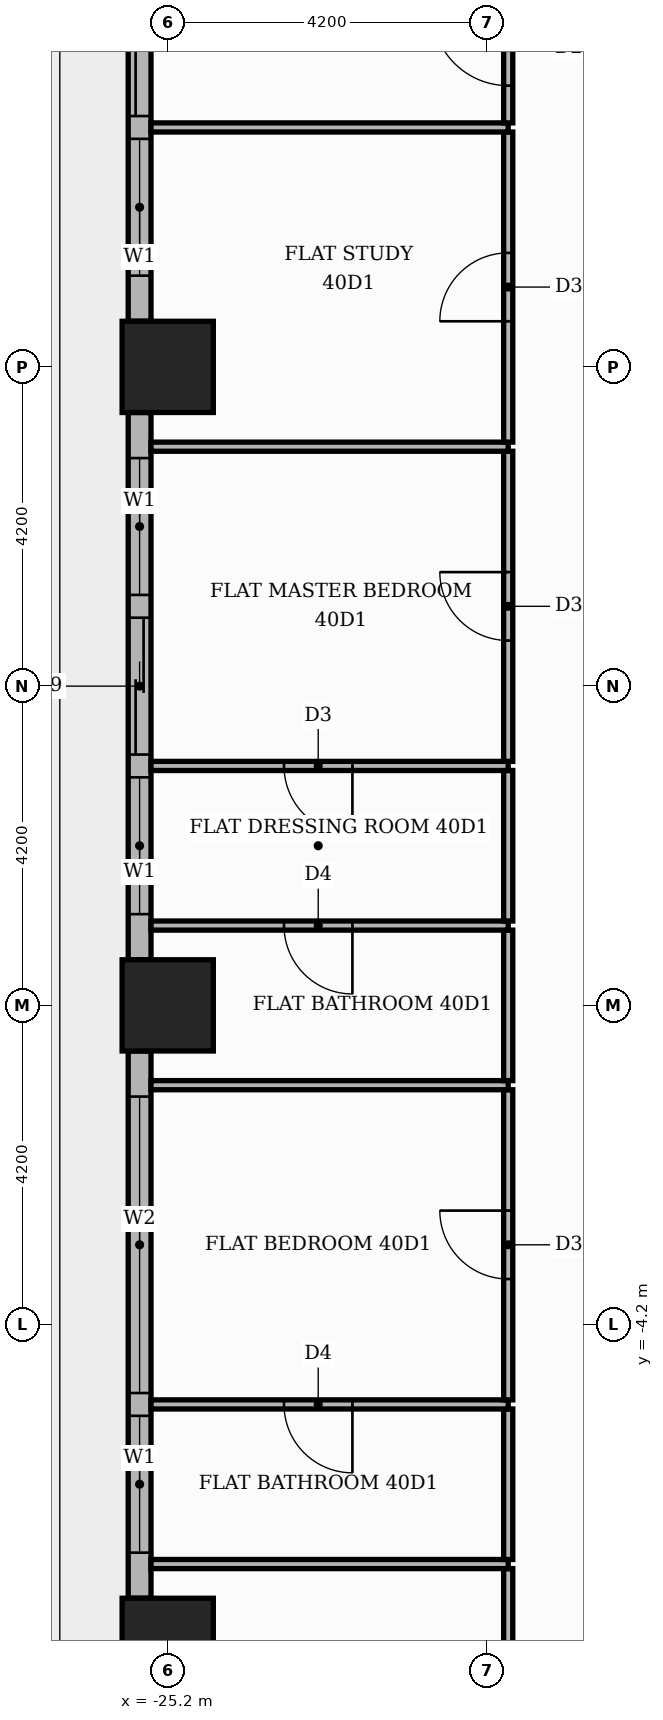
"""IFC4 building model, lengths in metres.
Left out: names, types, materials, properties, quantities, classifications, styles, units other than length and angle.
Written with IfcOpenShell. Run it as: python <this file> out.ifc"""

import sys

from ifc_helpers import new_model, si_unit, direction, frame, frame_2d, origin, origin_2d, place, context, subcontext, project, spatial, rectangle, extrude, element, fill, save


model = new_model("IFC4")
c1 = context("Model", 3, precision=1e-05, world=origin(), true_north=direction((0.0, 1.0)))
c2 = subcontext(c1, "Body", "Model", "MODEL_VIEW")
j1 = project(units=[si_unit("LENGTHUNIT", "METRE"), si_unit("PLANEANGLEUNIT", "RADIAN")], contexts=[c1])
p1 = place(None, origin())
s1 = spatial("IfcSite", under=j1, at=p1, CompositionType="ELEMENT")
p2 = place(p1, origin())
s2 = spatial("IfcBuilding", under=s1, at=p2, CompositionType="ELEMENT")
p3 = place(p2, frame((0.0, 0.0, 168.9)))
s3 = spatial("IfcBuildingStorey", under=s2, at=p3, CompositionType="ELEMENT", Elevation=168.9)
for number, where, z_axis, x_axis in (
    (1, (-25.2, 0.0, 0.0), (0.0, 0.0, 1.0), (1.0, 0.0, 0.0)),
    (2, (-25.2, -8.4, 0.0), (0.0, 0.0, 1.0), (1.0, 0.0, 0.0)),
    (3, (-25.2, 8.4, 0.0), (0.0, 0.0, 1.0), (1.0, 0.0, 0.0)),
):
    element("IfcColumn", number, at=place(p3, frame(where, z_axis=z_axis, x_axis=x_axis)), inside=s3, PredefinedType="COLUMN", context=c2, shape_type="SweptSolid", body=[
        extrude(rectangle(XDim=1.2, YDim=1.2, at=origin_2d()), origin(), (0.0, 0.0, 1.0), 3.9),
    ])
p4 = place(p3, frame((-25.57, 16.2, 0.0), z_axis=(0.0, 0.0, 1.0), x_axis=(0.0, -1.0, 0.0)))
e4 = element("IfcWall", 4, at=p4, inside=s3, PredefinedType="STANDARD", context=c2, shape_type="SweptSolid", body=[
    extrude(rectangle(XDim=7.2, YDim=0.3, at=frame_2d((3.6, 0.0))), origin(), (0.0, 0.0, 1.0), 3.48),
])
p5 = place(p4, frame((0.6, 0.0, 0.0)))
e5 = element("IfcOpeningElement", 5, at=p5, cuts=e4, PredefinedType="OPENING", context=c2, shape_type="SweptSolid", body=[
    extrude(rectangle(XDim=3.9, YDim=2.4, at=frame_2d((1.95, 1.2))), frame((0.0, 0.16, 0.0), z_axis=(0.0, -1.0, 0.0), x_axis=(1.0, 0.0, 0.0)), (0.0, 0.0, 1.0), 0.32),
])
p6 = place(p4, frame((4.8, 0.0, 0.9)))
e6 = element("IfcOpeningElement", 6, at=p6, cuts=e4, PredefinedType="OPENING", context=c2, shape_type="SweptSolid", body=[
    extrude(rectangle(XDim=1.8, YDim=2.1, at=frame_2d((0.9, 1.05))), frame((0.0, 0.16, 0.0), z_axis=(0.0, -1.0, 0.0), x_axis=(1.0, 0.0, 0.0)), (0.0, 0.0, 1.0), 0.32),
])
p7 = place(p3, frame((-25.57, 7.8, 0.0), z_axis=(0.0, 0.0, 1.0), x_axis=(0.0, -1.0, 0.0)))
e7 = element("IfcWall", 7, at=p7, inside=s3, PredefinedType="STANDARD", context=c2, shape_type="SweptSolid", body=[
    extrude(rectangle(XDim=7.2, YDim=0.3, at=frame_2d((3.6, 0.0))), origin(), (0.0, 0.0, 1.0), 3.48),
])
p8 = place(p7, frame((0.6, 0.0, 0.9)))
e8 = element("IfcOpeningElement", 8, at=p8, cuts=e7, PredefinedType="OPENING", context=c2, shape_type="SweptSolid", body=[
    extrude(rectangle(XDim=1.8, YDim=2.1, at=frame_2d((0.9, 1.05))), frame((0.0, 0.16, 0.0), z_axis=(0.0, -1.0, 0.0), x_axis=(1.0, 0.0, 0.0)), (0.0, 0.0, 1.0), 0.32),
])
p9 = place(p7, frame((2.7, 0.0, 0.0)))
e9 = element("IfcOpeningElement", 9, at=p9, cuts=e7, PredefinedType="OPENING", context=c2, shape_type="SweptSolid", body=[
    extrude(rectangle(XDim=1.8, YDim=2.4, at=frame_2d((0.9, 1.2))), frame((0.0, 0.16, 0.0), z_axis=(0.0, -1.0, 0.0), x_axis=(1.0, 0.0, 0.0)), (0.0, 0.0, 1.0), 0.32),
])
p10 = place(p7, frame((4.8, 0.0, 0.9)))
e10 = element("IfcOpeningElement", 10, at=p10, cuts=e7, PredefinedType="OPENING", context=c2, shape_type="SweptSolid", body=[
    extrude(rectangle(XDim=1.8, YDim=2.1, at=frame_2d((0.9, 1.05))), frame((0.0, 0.16, 0.0), z_axis=(0.0, -1.0, 0.0), x_axis=(1.0, 0.0, 0.0)), (0.0, 0.0, 1.0), 0.32),
])
p11 = place(p3, frame((-25.57, -0.6, 0.0), z_axis=(0.0, 0.0, 1.0), x_axis=(0.0, -1.0, 0.0)))
e11 = element("IfcWall", 11, at=p11, inside=s3, PredefinedType="STANDARD", context=c2, shape_type="SweptSolid", body=[
    extrude(rectangle(XDim=7.2, YDim=0.3, at=frame_2d((3.6, 0.0))), origin(), (0.0, 0.0, 1.0), 3.48),
])
p12 = place(p11, frame((0.6, 0.0, 0.9)))
e12 = element("IfcOpeningElement", 12, at=p12, cuts=e11, PredefinedType="OPENING", context=c2, shape_type="SweptSolid", body=[
    extrude(rectangle(XDim=3.9, YDim=2.1, at=frame_2d((1.95, 1.05))), frame((0.0, 0.16, 0.0), z_axis=(0.0, -1.0, 0.0), x_axis=(1.0, 0.0, 0.0)), (0.0, 0.0, 1.0), 0.32),
])
p13 = place(p11, frame((4.8, 0.0, 0.9)))
e13 = element("IfcOpeningElement", 13, at=p13, cuts=e11, PredefinedType="OPENING", context=c2, shape_type="SweptSolid", body=[
    extrude(rectangle(XDim=1.8, YDim=2.1, at=frame_2d((0.9, 1.05))), frame((0.0, 0.16, 0.0), z_axis=(0.0, -1.0, 0.0), x_axis=(1.0, 0.0, 0.0)), (0.0, 0.0, 1.0), 0.32),
])
p14 = place(p3, frame((-20.72, -11.49, 0.0), z_axis=(0.0, 0.0, 1.0), x_axis=(0.0, 1.0, 0.0)))
e14 = element("IfcWall", 14, at=p14, inside=s3, PredefinedType="PARTITIONING", context=c2, shape_type="SweptSolid", body=[
    extrude(rectangle(XDim=4.08, YDim=0.12, at=frame_2d((2.04, 0.0))), origin(), (0.0, 0.0, 1.0), 3.48),
])
p15 = place(p14, frame((1.59, 0.0, 0.0)))
e15 = element("IfcOpeningElement", 15, at=p15, cuts=e14, PredefinedType="OPENING", context=c2, shape_type="SweptSolid", body=[
    extrude(rectangle(XDim=0.9, YDim=2.1, at=frame_2d((0.45, 1.05))), frame((0.0, 0.07, 0.0), z_axis=(0.0, -1.0, 0.0), x_axis=(1.0, 0.0, 0.0)), (0.0, 0.0, 1.0), 0.14),
])
p16 = place(p3, frame((-25.42, -7.35, 0.0), z_axis=(0.0, 0.0, 1.0), x_axis=(1.0, 0.0, 0.0)))
e16 = element("IfcWall", 16, at=p16, inside=s3, PredefinedType="PARTITIONING", context=c2, shape_type="SweptSolid", body=[
    extrude(rectangle(XDim=4.7, YDim=0.12, at=frame_2d((2.35, 0.0))), origin(), (0.0, 0.0, 1.0), 3.48),
])
p17 = place(p3, frame((-20.72, -7.29, 0.0), z_axis=(0.0, 0.0, 1.0), x_axis=(0.0, 1.0, 0.0)))
e17 = element("IfcWall", 17, at=p17, inside=s3, PredefinedType="PARTITIONING", context=c2, shape_type="SweptSolid", body=[
    extrude(rectangle(XDim=1.98, YDim=0.12, at=frame_2d((0.99, 0.0))), origin(), (0.0, 0.0, 1.0), 3.48),
])
p18 = place(p3, frame((-25.42, -5.25, 0.0), z_axis=(0.0, 0.0, 1.0), x_axis=(1.0, 0.0, 0.0)))
e18 = element("IfcWall", 18, at=p18, inside=s3, PredefinedType="PARTITIONING", context=c2, shape_type="SweptSolid", body=[
    extrude(rectangle(XDim=4.7, YDim=0.12, at=frame_2d((2.35, 0.0))), origin(), (0.0, 0.0, 1.0), 3.48),
])
p19 = place(p18, frame((1.75, 0.0, 0.0)))
e19 = element("IfcOpeningElement", 19, at=p19, cuts=e18, PredefinedType="OPENING", context=c2, shape_type="SweptSolid", body=[
    extrude(rectangle(XDim=0.9, YDim=2.1, at=frame_2d((0.45, 1.05))), frame((0.0, 0.07, 0.0), z_axis=(0.0, -1.0, 0.0), x_axis=(1.0, 0.0, 0.0)), (0.0, 0.0, 1.0), 0.14),
])
p20 = place(p3, frame((-20.72, -5.19, 0.0), z_axis=(0.0, 0.0, 1.0), x_axis=(0.0, 1.0, 0.0)))
e20 = element("IfcWall", 20, at=p20, inside=s3, PredefinedType="PARTITIONING", context=c2, shape_type="SweptSolid", body=[
    extrude(rectangle(XDim=4.08, YDim=0.12, at=frame_2d((2.04, 0.0))), origin(), (0.0, 0.0, 1.0), 3.48),
])
p21 = place(p20, frame((1.59, 0.0, 0.0)))
e21 = element("IfcOpeningElement", 21, at=p21, cuts=e20, PredefinedType="OPENING", context=c2, shape_type="SweptSolid", body=[
    extrude(rectangle(XDim=0.9, YDim=2.1, at=frame_2d((0.45, 1.05))), frame((0.0, 0.07, 0.0), z_axis=(0.0, -1.0, 0.0), x_axis=(1.0, 0.0, 0.0)), (0.0, 0.0, 1.0), 0.14),
])
p22 = place(p3, frame((-25.42, -1.05, 0.0), z_axis=(0.0, 0.0, 1.0), x_axis=(1.0, 0.0, 0.0)))
e22 = element("IfcWall", 22, at=p22, inside=s3, PredefinedType="PARTITIONING", context=c2, shape_type="SweptSolid", body=[
    extrude(rectangle(XDim=4.7, YDim=0.12, at=frame_2d((2.35, 0.0))), origin(), (0.0, 0.0, 1.0), 3.48),
])
p23 = place(p3, frame((-20.72, -0.99, 0.0), z_axis=(0.0, 0.0, 1.0), x_axis=(0.0, 1.0, 0.0)))
e23 = element("IfcWall", 23, at=p23, inside=s3, PredefinedType="PARTITIONING", context=c2, shape_type="SweptSolid", body=[
    extrude(rectangle(XDim=1.98, YDim=0.12, at=frame_2d((0.99, 0.0))), origin(), (0.0, 0.0, 1.0), 3.48),
])
p24 = place(p3, frame((-25.42, 1.05, 0.0), z_axis=(0.0, 0.0, 1.0), x_axis=(1.0, 0.0, 0.0)))
e24 = element("IfcWall", 24, at=p24, inside=s3, PredefinedType="PARTITIONING", context=c2, shape_type="SweptSolid", body=[
    extrude(rectangle(XDim=4.7, YDim=0.12, at=frame_2d((2.35, 0.0))), origin(), (0.0, 0.0, 1.0), 3.48),
])
p25 = place(p24, frame((1.75, 0.0, 0.0)))
e25 = element("IfcOpeningElement", 25, at=p25, cuts=e24, PredefinedType="OPENING", context=c2, shape_type="SweptSolid", body=[
    extrude(rectangle(XDim=0.9, YDim=2.1, at=frame_2d((0.45, 1.05))), frame((0.0, 0.07, 0.0), z_axis=(0.0, -1.0, 0.0), x_axis=(1.0, 0.0, 0.0)), (0.0, 0.0, 1.0), 0.14),
])
p26 = place(p3, frame((-20.72, 1.11, 0.0), z_axis=(0.0, 0.0, 1.0), x_axis=(0.0, 1.0, 0.0)))
e26 = element("IfcWall", 26, at=p26, inside=s3, PredefinedType="PARTITIONING", context=c2, shape_type="SweptSolid", body=[
    extrude(rectangle(XDim=1.98, YDim=0.12, at=frame_2d((0.99, 0.0))), origin(), (0.0, 0.0, 1.0), 3.48),
])
p27 = place(p3, frame((-25.42, 3.15, 0.0), z_axis=(0.0, 0.0, 1.0), x_axis=(1.0, 0.0, 0.0)))
e27 = element("IfcWall", 27, at=p27, inside=s3, PredefinedType="PARTITIONING", context=c2, shape_type="SweptSolid", body=[
    extrude(rectangle(XDim=4.7, YDim=0.12, at=frame_2d((2.35, 0.0))), origin(), (0.0, 0.0, 1.0), 3.48),
])
p28 = place(p27, frame((1.75, 0.0, 0.0)))
e28 = element("IfcOpeningElement", 28, at=p28, cuts=e27, PredefinedType="OPENING", context=c2, shape_type="SweptSolid", body=[
    extrude(rectangle(XDim=0.9, YDim=2.1, at=frame_2d((0.45, 1.05))), frame((0.0, 0.07, 0.0), z_axis=(0.0, -1.0, 0.0), x_axis=(1.0, 0.0, 0.0)), (0.0, 0.0, 1.0), 0.14),
])
p29 = place(p3, frame((-20.72, 3.21, 0.0), z_axis=(0.0, 0.0, 1.0), x_axis=(0.0, 1.0, 0.0)))
e29 = element("IfcWall", 29, at=p29, inside=s3, PredefinedType="PARTITIONING", context=c2, shape_type="SweptSolid", body=[
    extrude(rectangle(XDim=4.08, YDim=0.12, at=frame_2d((2.04, 0.0))), origin(), (0.0, 0.0, 1.0), 3.48),
])
p30 = place(p29, frame((1.59, 0.0, 0.0)))
e30 = element("IfcOpeningElement", 30, at=p30, cuts=e29, PredefinedType="OPENING", context=c2, shape_type="SweptSolid", body=[
    extrude(rectangle(XDim=0.9, YDim=2.1, at=frame_2d((0.45, 1.05))), frame((0.0, 0.07, 0.0), z_axis=(0.0, -1.0, 0.0), x_axis=(1.0, 0.0, 0.0)), (0.0, 0.0, 1.0), 0.14),
])
p31 = place(p3, frame((-25.42, 7.35, 0.0), z_axis=(0.0, 0.0, 1.0), x_axis=(1.0, 0.0, 0.0)))
e31 = element("IfcWall", 31, at=p31, inside=s3, PredefinedType="PARTITIONING", context=c2, shape_type="SweptSolid", body=[
    extrude(rectangle(XDim=4.7, YDim=0.12, at=frame_2d((2.35, 0.0))), origin(), (0.0, 0.0, 1.0), 3.48),
])
p32 = place(p3, frame((-20.72, 7.41, 0.0), z_axis=(0.0, 0.0, 1.0), x_axis=(0.0, 1.0, 0.0)))
e32 = element("IfcWall", 32, at=p32, inside=s3, PredefinedType="PARTITIONING", context=c2, shape_type="SweptSolid", body=[
    extrude(rectangle(XDim=4.08, YDim=0.12, at=frame_2d((2.04, 0.0))), origin(), (0.0, 0.0, 1.0), 3.48),
])
p33 = place(p32, frame((1.59, 0.0, 0.0)))
e33 = element("IfcOpeningElement", 33, at=p33, cuts=e32, PredefinedType="OPENING", context=c2, shape_type="SweptSolid", body=[
    extrude(rectangle(XDim=0.9, YDim=2.1, at=frame_2d((0.45, 1.05))), frame((0.0, 0.07, 0.0), z_axis=(0.0, -1.0, 0.0), x_axis=(1.0, 0.0, 0.0)), (0.0, 0.0, 1.0), 0.14),
])
p34 = place(p3, frame((-25.42, 11.55, 0.0), z_axis=(0.0, 0.0, 1.0), x_axis=(1.0, 0.0, 0.0)))
e34 = element("IfcWall", 34, at=p34, inside=s3, PredefinedType="PARTITIONING", context=c2, shape_type="SweptSolid", body=[
    extrude(rectangle(XDim=4.7, YDim=0.12, at=frame_2d((2.35, 0.0))), origin(), (0.0, 0.0, 1.0), 3.48),
])
p35 = place(p3, frame((-20.72, 11.61, 0.0), z_axis=(0.0, 0.0, 1.0), x_axis=(0.0, 1.0, 0.0)))
e35 = element("IfcWall", 35, at=p35, inside=s3, PredefinedType="PARTITIONING", context=c2, shape_type="SweptSolid", body=[
    extrude(rectangle(XDim=1.98, YDim=0.12, at=frame_2d((0.99, 0.0))), origin(), (0.0, 0.0, 1.0), 3.48),
])
p36 = place(p35, frame((0.49, 0.0, 0.0)))
e36 = element("IfcOpeningElement", 36, at=p36, cuts=e35, PredefinedType="OPENING", context=c2, shape_type="SweptSolid", body=[
    extrude(rectangle(XDim=1.0, YDim=2.1, at=frame_2d((0.5, 1.05))), frame((0.0, 0.07, 0.0), z_axis=(0.0, -1.0, 0.0), x_axis=(1.0, 0.0, 0.0)), (0.0, 0.0, 1.0), 0.14),
])
p37 = place(p5, origin())
e37 = element("IfcDoor", 37, at=p37, inside=s3, OperationType="SLIDING_TO_LEFT", PredefinedType="DOOR", context=c2, shape_type="SweptSolid", body=[
    extrude(rectangle(XDim=3.9, YDim=2.4, at=frame_2d((1.95, 1.2))), frame((0.0, 0.025, 0.0), z_axis=(0.0, -1.0, 0.0), x_axis=(1.0, 0.0, 0.0)), (0.0, 0.0, 1.0), 0.05),
])
fill(e5, e37)
p38 = place(p6, origin())
e38 = element("IfcWindow", 38, at=p38, inside=s3, PartitioningType="SINGLE_PANEL", PredefinedType="WINDOW", context=c2, shape_type="SweptSolid", body=[
    extrude(rectangle(XDim=1.8, YDim=2.1, at=frame_2d((0.9, 1.05))), frame((0.0, 0.03, 0.0), z_axis=(0.0, -1.0, 0.0), x_axis=(1.0, 0.0, 0.0)), (0.0, 0.0, 1.0), 0.06),
])
fill(e6, e38)
p39 = place(p8, origin())
e39 = element("IfcWindow", 39, at=p39, inside=s3, PartitioningType="SINGLE_PANEL", PredefinedType="WINDOW", context=c2, shape_type="SweptSolid", body=[
    extrude(rectangle(XDim=1.8, YDim=2.1, at=frame_2d((0.9, 1.05))), frame((0.0, 0.03, 0.0), z_axis=(0.0, -1.0, 0.0), x_axis=(1.0, 0.0, 0.0)), (0.0, 0.0, 1.0), 0.06),
])
fill(e8, e39)
p40 = place(p9, origin())
e40 = element("IfcDoor", 40, at=p40, inside=s3, OperationType="SLIDING_TO_LEFT", PredefinedType="DOOR", context=c2, shape_type="SweptSolid", body=[
    extrude(rectangle(XDim=1.8, YDim=2.4, at=frame_2d((0.9, 1.2))), frame((0.0, 0.025, 0.0), z_axis=(0.0, -1.0, 0.0), x_axis=(1.0, 0.0, 0.0)), (0.0, 0.0, 1.0), 0.05),
])
fill(e9, e40)
p41 = place(p10, origin())
e41 = element("IfcWindow", 41, at=p41, inside=s3, PartitioningType="SINGLE_PANEL", PredefinedType="WINDOW", context=c2, shape_type="SweptSolid", body=[
    extrude(rectangle(XDim=1.8, YDim=2.1, at=frame_2d((0.9, 1.05))), frame((0.0, 0.03, 0.0), z_axis=(0.0, -1.0, 0.0), x_axis=(1.0, 0.0, 0.0)), (0.0, 0.0, 1.0), 0.06),
])
fill(e10, e41)
p42 = place(p12, origin())
e42 = element("IfcWindow", 42, at=p42, inside=s3, PartitioningType="SINGLE_PANEL", PredefinedType="WINDOW", context=c2, shape_type="SweptSolid", body=[
    extrude(rectangle(XDim=3.9, YDim=2.1, at=frame_2d((1.95, 1.05))), frame((0.0, 0.03, 0.0), z_axis=(0.0, -1.0, 0.0), x_axis=(1.0, 0.0, 0.0)), (0.0, 0.0, 1.0), 0.06),
])
fill(e12, e42)
p43 = place(p13, origin())
e43 = element("IfcWindow", 43, at=p43, inside=s3, PartitioningType="SINGLE_PANEL", PredefinedType="WINDOW", context=c2, shape_type="SweptSolid", body=[
    extrude(rectangle(XDim=1.8, YDim=2.1, at=frame_2d((0.9, 1.05))), frame((0.0, 0.03, 0.0), z_axis=(0.0, -1.0, 0.0), x_axis=(1.0, 0.0, 0.0)), (0.0, 0.0, 1.0), 0.06),
])
fill(e13, e43)
p44 = place(p36, origin())
e44 = element("IfcDoor", 44, at=p44, inside=s3, OperationType="SINGLE_SWING_RIGHT", PredefinedType="DOOR", context=c2, shape_type="SweptSolid", body=[
    extrude(rectangle(XDim=1.0, YDim=2.1, at=frame_2d((0.5, 1.05))), frame((0.0, 0.025, 0.0), z_axis=(0.0, -1.0, 0.0), x_axis=(1.0, 0.0, 0.0)), (0.0, 0.0, 1.0), 0.05),
])
fill(e36, e44)
p45 = place(p33, origin())
e45 = element("IfcDoor", 45, at=p45, inside=s3, OperationType="SINGLE_SWING_LEFT", PredefinedType="DOOR", context=c2, shape_type="SweptSolid", body=[
    extrude(rectangle(XDim=0.9, YDim=2.1, at=frame_2d((0.45, 1.05))), frame((0.0, 0.025, 0.0), z_axis=(0.0, -1.0, 0.0), x_axis=(1.0, 0.0, 0.0)), (0.0, 0.0, 1.0), 0.05),
])
fill(e33, e45)
p46 = place(p30, origin())
e46 = element("IfcDoor", 46, at=p46, inside=s3, OperationType="SINGLE_SWING_RIGHT", PredefinedType="DOOR", context=c2, shape_type="SweptSolid", body=[
    extrude(rectangle(XDim=0.9, YDim=2.1, at=frame_2d((0.45, 1.05))), frame((0.0, 0.025, 0.0), z_axis=(0.0, -1.0, 0.0), x_axis=(1.0, 0.0, 0.0)), (0.0, 0.0, 1.0), 0.05),
])
fill(e30, e46)
p47 = place(p28, frame((0.9, 0.0, 0.0), z_axis=(0.0, 0.0, 1.0), x_axis=(-1.0, 0.0, 0.0)))
e47 = element("IfcDoor", 47, at=p47, inside=s3, OperationType="SINGLE_SWING_RIGHT", PredefinedType="DOOR", context=c2, shape_type="SweptSolid", body=[
    extrude(rectangle(XDim=0.9, YDim=2.1, at=frame_2d((0.45, 1.05))), frame((0.0, 0.025, 0.0), z_axis=(0.0, -1.0, 0.0), x_axis=(1.0, 0.0, 0.0)), (0.0, 0.0, 1.0), 0.05),
])
fill(e28, e47)
p48 = place(p25, frame((0.9, 0.0, 0.0), z_axis=(0.0, 0.0, 1.0), x_axis=(-1.0, 0.0, 0.0)))
e48 = element("IfcDoor", 48, at=p48, inside=s3, OperationType="SINGLE_SWING_RIGHT", PredefinedType="DOOR", context=c2, shape_type="SweptSolid", body=[
    extrude(rectangle(XDim=0.9, YDim=2.1, at=frame_2d((0.45, 1.05))), frame((0.0, 0.025, 0.0), z_axis=(0.0, -1.0, 0.0), x_axis=(1.0, 0.0, 0.0)), (0.0, 0.0, 1.0), 0.05),
])
fill(e25, e48)
p49 = place(p21, origin())
e49 = element("IfcDoor", 49, at=p49, inside=s3, OperationType="SINGLE_SWING_RIGHT", PredefinedType="DOOR", context=c2, shape_type="SweptSolid", body=[
    extrude(rectangle(XDim=0.9, YDim=2.1, at=frame_2d((0.45, 1.05))), frame((0.0, 0.025, 0.0), z_axis=(0.0, -1.0, 0.0), x_axis=(1.0, 0.0, 0.0)), (0.0, 0.0, 1.0), 0.05),
])
fill(e21, e49)
p50 = place(p19, frame((0.9, 0.0, 0.0), z_axis=(0.0, 0.0, 1.0), x_axis=(-1.0, 0.0, 0.0)))
e50 = element("IfcDoor", 50, at=p50, inside=s3, OperationType="SINGLE_SWING_RIGHT", PredefinedType="DOOR", context=c2, shape_type="SweptSolid", body=[
    extrude(rectangle(XDim=0.9, YDim=2.1, at=frame_2d((0.45, 1.05))), frame((0.0, 0.025, 0.0), z_axis=(0.0, -1.0, 0.0), x_axis=(1.0, 0.0, 0.0)), (0.0, 0.0, 1.0), 0.05),
])
fill(e19, e50)
save(model, sys.argv[1])
